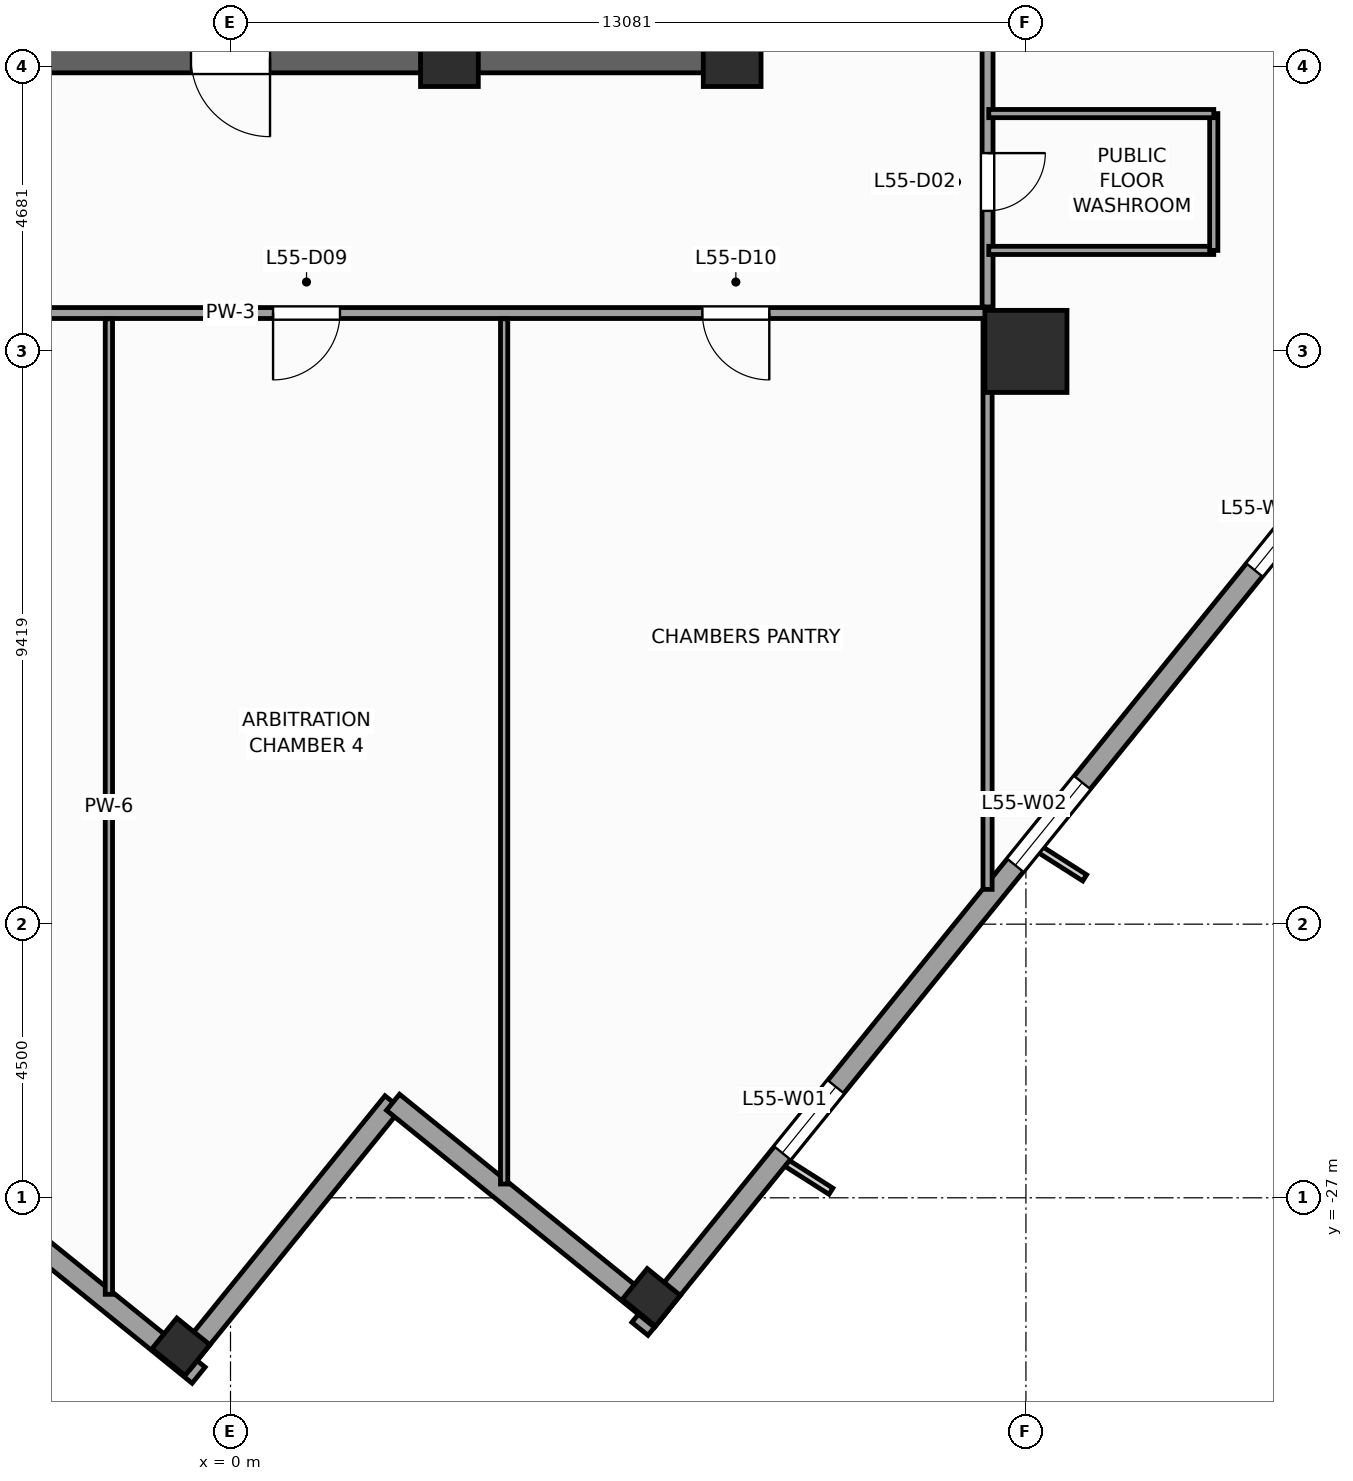
"""IFC4 building model, lengths in metres.
Left out: names, types, materials, properties, quantities, classifications, styles, units other than length and angle.
Written with IfcOpenShell. Run it as: python <this file> out.ifc"""

import sys

from ifc_helpers import new_model, si_unit, direction, frame, frame_2d, origin, origin_2d, place, context, subcontext, project, spatial, rectangle, extrude, source, transform, mapped, element, fill, save


model = new_model("IFC4")
c1 = context("Model", 3, precision=1e-05, world=origin(), true_north=direction((0.0, 1.0)))
c2 = subcontext(c1, "Body", "Model", "MODEL_VIEW")
j1 = project(units=[si_unit("LENGTHUNIT", "METRE"), si_unit("PLANEANGLEUNIT", "RADIAN")], contexts=[c1])
p1 = place(None, origin())
s1 = spatial("IfcSite", under=j1, at=p1, CompositionType="ELEMENT")
p2 = place(p1, origin())
s2 = spatial("IfcBuilding", under=s1, at=p2, CompositionType="ELEMENT")
p3 = place(p2, frame((0.0, 0.0, 229.0)))
s3 = spatial("IfcBuildingStorey", under=s2, at=p3, CompositionType="ELEMENT", Elevation=229.0)
p4 = place(p3, frame((-8.5, -8.25, 0.0), z_axis=(0.0, 0.0, 1.0), x_axis=(1.0, 0.0, 0.0)))
e1 = element("IfcWall", 1, at=p4, inside=s3, PredefinedType="SHEAR", context=c2, shape_type="SweptSolid", body=[
    extrude(rectangle(XDim=17.0, YDim=0.5, at=frame_2d((8.5, 0.0))), origin(), (0.0, 0.0, 1.0), 3.9),
])
p5 = place(p4, frame((7.85, 0.0, 0.0)))
e2 = element("IfcOpeningElement", 2, at=p5, cuts=e1, PredefinedType="OPENING", context=c2, shape_type="SweptSolid", body=[
    extrude(rectangle(XDim=1.3, YDim=2.2, at=frame_2d((0.65, 1.1))), frame((0.0, 0.26, 0.0), z_axis=(0.0, -1.0, 0.0), x_axis=(1.0, 0.0, 0.0)), (0.0, 0.0, 1.0), 0.52),
])
m1 = source(origin(), c2, "Body", "SweptSolid", [
    extrude(rectangle(XDim=0.95, YDim=0.95, at=origin_2d()), origin(), (0.0, 0.0, 1.0), 3.9),
])
for number, where, z_axis, x_axis in (
    (3, (8.25, -8.25, 0.0), (0.0, 0.0, 1.0), (1.0, 0.0, 0.0)),
    (4, (3.6, -8.25, 0.0), (0.0, 0.0, 1.0), (1.0, 0.0, 0.0)),
):
    element("IfcColumn", number, at=place(p3, frame(where, z_axis=z_axis, x_axis=x_axis)), inside=s3, PredefinedType="PILASTER", context=c2, shape_type="MappedRepresentation", body=[
        mapped(m1, transform((0.0, 0.0, 0.0), scale=1.0)),
    ])
m2 = source(origin(), c2, "Body", "SweptSolid", [
    extrude(rectangle(XDim=1.35, YDim=1.35, at=origin_2d()), origin(), (0.0, 0.0, 1.0), 3.9),
])
p6 = place(p3, frame((13.081, -13.081, 0.0), z_axis=(0.0, 0.0, 1.0), x_axis=(1.0, 0.0, 0.0)))
e5 = element("IfcColumn", 5, at=p6, inside=s3, PredefinedType="COLUMN", context=c2, shape_type="MappedRepresentation", body=[
    mapped(m2, transform((0.0, 0.0, 0.0), scale=1.0)),
])
m3 = source(origin(), c2, "Body", "SweptSolid", [
    extrude(rectangle(XDim=0.65, YDim=0.7, at=origin_2d()), origin(), (0.0, 0.0, 1.0), 3.9),
])
for number, where, z_axis, x_axis in (
    (6, (6.92, -28.637, 0.0), (0.0, 0.0, 1.0), (0.629, 0.777, 0.0)),
    (7, (-0.815, -29.45, 0.0), (0.0, 0.0, 1.0), (0.629, 0.777, 0.0)),
):
    element("IfcColumn", number, at=place(p3, frame(where, z_axis=z_axis, x_axis=x_axis)), inside=s3, PredefinedType="COLUMN", context=c2, shape_type="MappedRepresentation", body=[
        mapped(m3, transform((0.0, 0.0, 0.0), scale=1.0)),
    ])
p7 = place(p3, frame((6.733, -29.154, 0.0), z_axis=(0.0, 0.0, 1.0), x_axis=(0.629325378072, 0.77714192302, 0.0)))
e8 = element("IfcWall", 8, at=p7, inside=s3, PredefinedType="STANDARD", context=c2, shape_type="SweptSolid", body=[
    extrude(rectangle(XDim=36.84, YDim=0.34, at=frame_2d((18.42, 0.0))), origin(), (0.0, 0.0, 1.0), 2.96),
])
p8 = place(p7, frame((3.721, 0.0, 0.48)))
e9 = element("IfcOpeningElement", 9, at=p8, cuts=e8, PredefinedType="OPENING", context=c2, shape_type="SweptSolid", body=[
    extrude(rectangle(XDim=1.4, YDim=2.4, at=frame_2d((0.7, 1.2))), frame((0.0, 0.18, 0.0), z_axis=(0.0, -1.0, 0.0), x_axis=(1.0, 0.0, 0.0)), (0.0, 0.0, 1.0), 0.36),
])
p9 = place(p7, frame((9.809, 0.0, 0.58)))
e10 = element("IfcOpeningElement", 10, at=p9, cuts=e8, PredefinedType="OPENING", context=c2, shape_type="SweptSolid", body=[
    extrude(rectangle(XDim=1.75, YDim=2.3, at=frame_2d((0.875, 1.15))), frame((0.0, 0.18, 0.0), z_axis=(0.0, -1.0, 0.0), x_axis=(1.0, 0.0, 0.0)), (0.0, 0.0, 1.0), 0.36),
])
p10 = place(p7, frame((16.058, 0.0, 0.58)))
e11 = element("IfcOpeningElement", 11, at=p10, cuts=e8, PredefinedType="OPENING", context=c2, shape_type="SweptSolid", body=[
    extrude(rectangle(XDim=1.75, YDim=2.3, at=frame_2d((0.875, 1.15))), frame((0.0, 0.18, 0.0), z_axis=(0.0, -1.0, 0.0), x_axis=(1.0, 0.0, 0.0)), (0.0, 0.0, 1.0), 0.36),
])
p11 = place(p7, frame((24.176, 0.0, 0.58)))
e12 = element("IfcOpeningElement", 12, at=p11, cuts=e8, PredefinedType="OPENING", context=c2, shape_type="SweptSolid", body=[
    extrude(rectangle(XDim=1.75, YDim=2.3, at=frame_2d((0.875, 1.15))), frame((0.0, 0.18, 0.0), z_axis=(0.0, -1.0, 0.0), x_axis=(1.0, 0.0, 0.0)), (0.0, 0.0, 1.0), 0.36),
])
p12 = place(p7, frame((30.982, 0.0, 0.48)))
e13 = element("IfcOpeningElement", 13, at=p12, cuts=e8, PredefinedType="OPENING", context=c2, shape_type="SweptSolid", body=[
    extrude(rectangle(XDim=1.4, YDim=2.4, at=frame_2d((0.7, 1.2))), frame((0.0, 0.18, 0.0), z_axis=(0.0, -1.0, 0.0), x_axis=(1.0, 0.0, 0.0)), (0.0, 0.0, 1.0), 0.36),
])
p13 = place(p3, frame((-29.154, -6.733, 0.0), z_axis=(0.0, 0.0, 1.0), x_axis=(0.77714192302, -0.629325378072, 0.0)))
e14 = element("IfcWall", 14, at=p13, inside=s3, PredefinedType="STANDARD", context=c2, shape_type="SweptSolid", body=[
    extrude(rectangle(XDim=36.84, YDim=0.34, at=frame_2d((18.42, 0.0))), origin(), (0.0, 0.0, 1.0), 2.96),
])
p14 = place(p13, frame((23.495, 0.0, 0.0)))
e15 = element("IfcOpeningElement", 15, at=p14, cuts=e14, PredefinedType="OPENING", context=c2, shape_type="SweptSolid", body=[
    extrude(rectangle(XDim=1.05, YDim=2.25, at=frame_2d((0.525, 1.125))), frame((0.0, 0.18, 0.0), z_axis=(0.0, -1.0, 0.0), x_axis=(1.0, 0.0, 0.0)), (0.0, 0.0, 1.0), 0.36),
])
p15 = place(p13, frame((3.721, 0.0, 0.48)))
e16 = element("IfcOpeningElement", 16, at=p15, cuts=e14, PredefinedType="OPENING", context=c2, shape_type="SweptSolid", body=[
    extrude(rectangle(XDim=1.4, YDim=2.4, at=frame_2d((0.7, 1.2))), frame((0.0, 0.18, 0.0), z_axis=(0.0, -1.0, 0.0), x_axis=(1.0, 0.0, 0.0)), (0.0, 0.0, 1.0), 0.36),
])
p16 = place(p13, frame((9.809, 0.0, 0.58)))
e17 = element("IfcOpeningElement", 17, at=p16, cuts=e14, PredefinedType="OPENING", context=c2, shape_type="SweptSolid", body=[
    extrude(rectangle(XDim=1.75, YDim=2.3, at=frame_2d((0.875, 1.15))), frame((0.0, 0.18, 0.0), z_axis=(0.0, -1.0, 0.0), x_axis=(1.0, 0.0, 0.0)), (0.0, 0.0, 1.0), 0.36),
])
p17 = place(p13, frame((16.058, 0.0, 0.58)))
e18 = element("IfcOpeningElement", 18, at=p17, cuts=e14, PredefinedType="OPENING", context=c2, shape_type="SweptSolid", body=[
    extrude(rectangle(XDim=1.75, YDim=2.3, at=frame_2d((0.875, 1.15))), frame((0.0, 0.18, 0.0), z_axis=(0.0, -1.0, 0.0), x_axis=(1.0, 0.0, 0.0)), (0.0, 0.0, 1.0), 0.36),
])
p18 = place(p13, frame((25.676, 0.0, 0.58)))
e19 = element("IfcOpeningElement", 19, at=p18, cuts=e14, PredefinedType="OPENING", context=c2, shape_type="SweptSolid", body=[
    extrude(rectangle(XDim=1.75, YDim=2.3, at=frame_2d((0.875, 1.15))), frame((0.0, 0.18, 0.0), z_axis=(0.0, -1.0, 0.0), x_axis=(1.0, 0.0, 0.0)), (0.0, 0.0, 1.0), 0.36),
])
p19 = place(p13, frame((30.982, 0.0, 0.48)))
e20 = element("IfcOpeningElement", 20, at=p19, cuts=e14, PredefinedType="OPENING", context=c2, shape_type="SweptSolid", body=[
    extrude(rectangle(XDim=1.4, YDim=2.4, at=frame_2d((0.7, 1.2))), frame((0.0, 0.18, 0.0), z_axis=(0.0, -1.0, 0.0), x_axis=(1.0, 0.0, 0.0)), (0.0, 0.0, 1.0), 0.36),
])
p20 = place(p3, frame((-0.789, -29.703, 0.0), z_axis=(0.0, 0.0, 1.0), x_axis=(0.629323365087, 0.77714355312, 0.0)))
e21 = element("IfcWall", 21, at=p20, inside=s3, PredefinedType="STANDARD", context=c2, shape_type="SweptSolid", body=[
    extrude(rectangle(XDim=5.5, YDim=0.34, at=frame_2d((2.75, 0.0))), origin(), (0.0, 0.0, 1.0), 3.66),
])
p21 = place(p3, frame((2.673, -25.429, 0.0), z_axis=(0.0, 0.0, 1.0), x_axis=(0.777162640055, -0.629299794138, 0.0)))
e22 = element("IfcWall", 22, at=p21, inside=s3, PredefinedType="STANDARD", context=c2, shape_type="SweptSolid", body=[
    extrude(rectangle(XDim=5.67, YDim=0.34, at=frame_2d((2.835, 0.0))), origin(), (0.0, 0.0, 1.0), 3.66),
])
p22 = place(p3, frame((-12.45, -12.45, 0.0), z_axis=(0.0, 0.0, 1.0), x_axis=(1.0, 0.0, 0.0)))
e23 = element("IfcWall", 23, at=p22, inside=s3, PredefinedType="PARTITIONING", context=c2, shape_type="SweptSolid", body=[
    extrude(rectangle(XDim=24.9, YDim=0.18, at=frame_2d((12.45, 0.0))), origin(), (0.0, 0.0, 1.0), 3.66),
])
p23 = place(p22, frame((4.839, 0.0, 0.0)))
e24 = element("IfcOpeningElement", 24, at=p23, cuts=e23, PredefinedType="OPENING", context=c2, shape_type="SweptSolid", body=[
    extrude(rectangle(XDim=1.1, YDim=2.2, at=frame_2d((0.55, 1.1))), frame((0.0, 0.1, 0.0), z_axis=(0.0, -1.0, 0.0), x_axis=(1.0, 0.0, 0.0)), (0.0, 0.0, 1.0), 0.2),
])
p24 = place(p22, frame((13.15, 0.0, 0.0)))
e25 = element("IfcOpeningElement", 25, at=p24, cuts=e23, PredefinedType="OPENING", context=c2, shape_type="SweptSolid", body=[
    extrude(rectangle(XDim=1.1, YDim=2.2, at=frame_2d((0.55, 1.1))), frame((0.0, 0.1, 0.0), z_axis=(0.0, -1.0, 0.0), x_axis=(1.0, 0.0, 0.0)), (0.0, 0.0, 1.0), 0.2),
])
p25 = place(p22, frame((20.21, 0.0, 0.0)))
e26 = element("IfcOpeningElement", 26, at=p25, cuts=e23, PredefinedType="OPENING", context=c2, shape_type="SweptSolid", body=[
    extrude(rectangle(XDim=1.1, YDim=2.2, at=frame_2d((0.55, 1.1))), frame((0.0, 0.1, 0.0), z_axis=(0.0, -1.0, 0.0), x_axis=(1.0, 0.0, 0.0)), (0.0, 0.0, 1.0), 0.2),
])
p26 = place(p3, frame((12.45, -12.35, 0.0), z_axis=(0.0, 0.0, 1.0), x_axis=(0.0, 1.0, 0.0)))
e27 = element("IfcWall", 27, at=p26, inside=s3, PredefinedType="PARTITIONING", context=c2, shape_type="SweptSolid", body=[
    extrude(rectangle(XDim=16.15, YDim=0.18, at=frame_2d((8.075, 0.0))), origin(), (0.0, 0.0, 1.0), 3.66),
])
p27 = place(p26, frame((1.58, 0.0, 0.0)))
e28 = element("IfcOpeningElement", 28, at=p27, cuts=e27, PredefinedType="OPENING", context=c2, shape_type="SweptSolid", body=[
    extrude(rectangle(XDim=0.95, YDim=2.1, at=frame_2d((0.475, 1.05))), frame((0.0, 0.1, 0.0), z_axis=(0.0, -1.0, 0.0), x_axis=(1.0, 0.0, 0.0)), (0.0, 0.0, 1.0), 0.2),
])
p28 = place(p26, frame((14.111, 0.0, 0.0)))
e29 = element("IfcOpeningElement", 29, at=p28, cuts=e27, PredefinedType="OPENING", context=c2, shape_type="SweptSolid", body=[
    extrude(rectangle(XDim=1.1, YDim=2.2, at=frame_2d((0.55, 1.1))), frame((0.0, 0.1, 0.0), z_axis=(0.0, -1.0, 0.0), x_axis=(1.0, 0.0, 0.0)), (0.0, 0.0, 1.0), 0.2),
])
p29 = place(p26, frame((7.784, 0.0, 0.0)))
e30 = element("IfcOpeningElement", 30, at=p29, cuts=e27, PredefinedType="OPENING", context=c2, shape_type="SweptSolid", body=[
    extrude(rectangle(XDim=1.1, YDim=2.2, at=frame_2d((0.55, 1.1))), frame((0.0, 0.1, 0.0), z_axis=(0.0, -1.0, 0.0), x_axis=(1.0, 0.0, 0.0)), (0.0, 0.0, 1.0), 0.2),
])
p30 = place(p3, frame((-2.0, -28.587, 0.0), z_axis=(0.0, 0.0, 1.0), x_axis=(0.0, 1.0, 0.0)))
e31 = element("IfcWall", 31, at=p30, inside=s3, PredefinedType="PARTITIONING", context=c2, shape_type="SweptSolid", body=[
    extrude(rectangle(XDim=16.042, YDim=0.12, at=frame_2d((8.021, 0.0))), origin(), (0.0, 0.0, 1.0), 3.66),
])
p31 = place(p3, frame((4.5, -26.773, 0.0), z_axis=(0.0, 0.0, 1.0), x_axis=(0.0, 1.0, 0.0)))
e32 = element("IfcWall", 32, at=p31, inside=s3, PredefinedType="PARTITIONING", context=c2, shape_type="SweptSolid", body=[
    extrude(rectangle(XDim=14.229, YDim=0.12, at=frame_2d((7.114, 0.0))), origin(), (0.0, 0.0, 1.0), 3.66),
])
p32 = place(p3, frame((12.45, -21.928, 0.0), z_axis=(0.0, 0.0, 1.0), x_axis=(0.0, 1.0, 0.0)))
e33 = element("IfcWall", 33, at=p32, inside=s3, PredefinedType="PARTITIONING", context=c2, shape_type="SweptSolid", body=[
    extrude(rectangle(XDim=9.383, YDim=0.15, at=frame_2d((4.691, 0.0))), origin(), (0.0, 0.0, 1.0), 2.96),
])
p33 = place(p3, frame((12.47, -11.42, 0.0), z_axis=(0.0, 0.0, 1.0), x_axis=(1.0, 0.0, 0.0)))
e34 = element("IfcWall", 34, at=p33, inside=s3, PredefinedType="PARTITIONING", context=c2, shape_type="SweptSolid", body=[
    extrude(rectangle(XDim=3.7, YDim=0.135, at=frame_2d((1.85, 0.0))), origin(), (0.0, 0.0, 1.0), 3.66),
])
p34 = place(p3, frame((16.17, -11.42, 0.0), z_axis=(0.0, 0.0, 1.0), x_axis=(0.0, 1.0, 0.0)))
e35 = element("IfcWall", 35, at=p34, inside=s3, PredefinedType="PARTITIONING", context=c2, shape_type="SweptSolid", body=[
    extrude(rectangle(XDim=2.25, YDim=0.135, at=frame_2d((1.125, 0.0))), origin(), (0.0, 0.0, 1.0), 3.66),
])
p35 = place(p3, frame((12.47, -9.17, 0.0), z_axis=(0.0, 0.0, 1.0), x_axis=(1.0, 0.0, 0.0)))
e36 = element("IfcWall", 36, at=p35, inside=s3, PredefinedType="PARTITIONING", context=c2, shape_type="SweptSolid", body=[
    extrude(rectangle(XDim=3.7, YDim=0.135, at=frame_2d((1.85, 0.0))), origin(), (0.0, 0.0, 1.0), 3.66),
])
m4 = source(origin(), c2, "Body", "SweptSolid", [
    extrude(rectangle(XDim=1.4, YDim=2.4, at=frame_2d((0.7, 1.2))), frame((0.0, 0.03, 0.0), z_axis=(0.0, -1.0, 0.0), x_axis=(1.0, 0.0, 0.0)), (0.0, 0.0, 1.0), 0.06),
])
p36 = place(p8, origin())
e37 = element("IfcWindow", 37, at=p36, inside=s3, PartitioningType="SINGLE_PANEL", PredefinedType="WINDOW", context=c2, shape_type="MappedRepresentation", body=[
    mapped(m4, transform((0.0, 0.0, 0.0), scale=1.0)),
])
fill(e9, e37)
m5 = source(origin(), c2, "Body", "SweptSolid", [
    extrude(rectangle(XDim=1.75, YDim=2.3, at=frame_2d((0.875, 1.15))), frame((0.0, 0.03, 0.0), z_axis=(0.0, -1.0, 0.0), x_axis=(1.0, 0.0, 0.0)), (0.0, 0.0, 1.0), 0.06),
])
p37 = place(p9, origin())
e38 = element("IfcWindow", 38, at=p37, inside=s3, PartitioningType="SINGLE_PANEL", PredefinedType="WINDOW", context=c2, shape_type="MappedRepresentation", body=[
    mapped(m5, transform((0.0, 0.0, 0.0), scale=1.0)),
])
fill(e10, e38)
p38 = place(p10, origin())
e39 = element("IfcWindow", 39, at=p38, inside=s3, PartitioningType="SINGLE_PANEL", PredefinedType="WINDOW", context=c2, shape_type="MappedRepresentation", body=[
    mapped(m5, transform((0.0, 0.0, 0.0), scale=1.0)),
])
fill(e11, e39)
m6 = source(origin(), c2, "Body", "SweptSolid", [
    extrude(rectangle(XDim=1.3, YDim=2.2, at=frame_2d((0.65, 1.1))), frame((0.0, 0.025, 0.0), z_axis=(0.0, -1.0, 0.0), x_axis=(1.0, 0.0, 0.0)), (0.0, 0.0, 1.0), 0.05),
])
p39 = place(p5, frame((1.3, 0.0, 0.0), z_axis=(0.0, 0.0, 1.0), x_axis=(-1.0, 0.0, 0.0)))
e40 = element("IfcDoor", 40, at=p39, inside=s3, OperationType="SINGLE_SWING_RIGHT", PredefinedType="DOOR", context=c2, shape_type="MappedRepresentation", body=[
    mapped(m6, transform((0.0, 0.0, 0.0), scale=1.0)),
])
fill(e2, e40)
m7 = source(origin(), c2, "Body", "SweptSolid", [
    extrude(rectangle(XDim=0.95, YDim=2.1, at=frame_2d((0.475, 1.05))), frame((0.0, 0.025, 0.0), z_axis=(0.0, -1.0, 0.0), x_axis=(1.0, 0.0, 0.0)), (0.0, 0.0, 1.0), 0.05),
])
p40 = place(p27, frame((0.95, 0.0, 0.0), z_axis=(0.0, 0.0, 1.0), x_axis=(-1.0, 0.0, 0.0)))
e41 = element("IfcDoor", 41, at=p40, inside=s3, OperationType="SINGLE_SWING_RIGHT", PredefinedType="DOOR", context=c2, shape_type="MappedRepresentation", body=[
    mapped(m7, transform((0.0, 0.0, 0.0), scale=1.0)),
])
fill(e28, e41)
m8 = source(origin(), c2, "Body", "SweptSolid", [
    extrude(rectangle(XDim=1.1, YDim=2.2, at=frame_2d((0.55, 1.1))), frame((0.0, 0.025, 0.0), z_axis=(0.0, -1.0, 0.0), x_axis=(1.0, 0.0, 0.0)), (0.0, 0.0, 1.0), 0.05),
])
p41 = place(p24, frame((1.1, 0.0, 0.0), z_axis=(0.0, 0.0, 1.0), x_axis=(-1.0, 0.0, 0.0)))
e42 = element("IfcDoor", 42, at=p41, inside=s3, OperationType="SINGLE_SWING_LEFT", PredefinedType="DOOR", context=c2, shape_type="MappedRepresentation", body=[
    mapped(m8, transform((0.0, 0.0, 0.0), scale=1.0)),
])
fill(e25, e42)
p42 = place(p25, frame((1.1, 0.0, 0.0), z_axis=(0.0, 0.0, 1.0), x_axis=(-1.0, 0.0, 0.0)))
e43 = element("IfcDoor", 43, at=p42, inside=s3, OperationType="SINGLE_SWING_RIGHT", PredefinedType="DOOR", context=c2, shape_type="MappedRepresentation", body=[
    mapped(m8, transform((0.0, 0.0, 0.0), scale=1.0)),
])
fill(e26, e43)
save(model, sys.argv[1])
